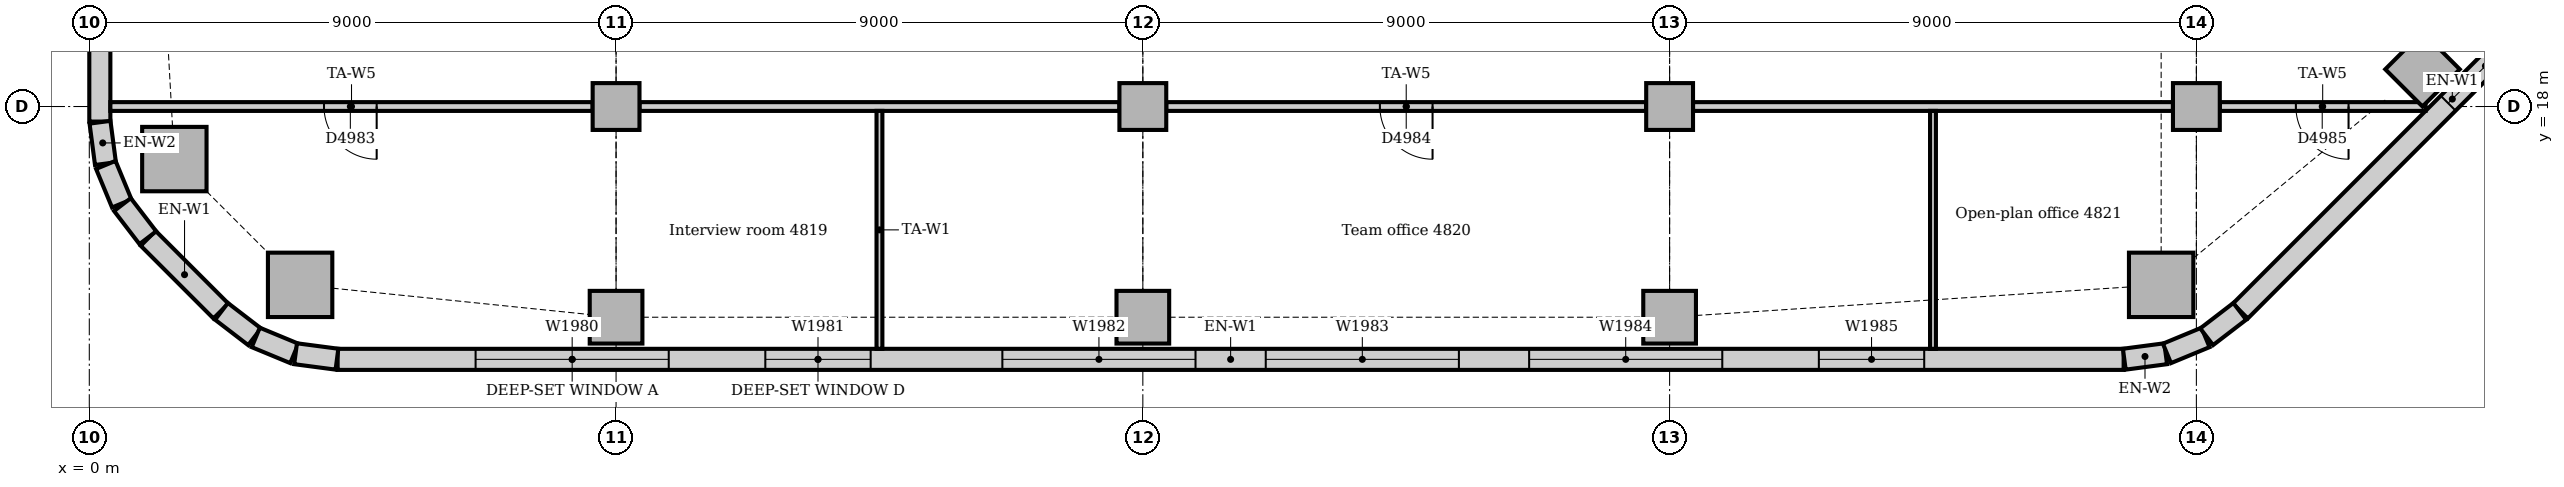
"""IFC4 building model, lengths in metres.
Left out: names, types, materials, properties, quantities, classifications, styles, units other than length and angle.
Written with IfcOpenShell. Run it as: python <this file> out.ifc"""

import sys

from ifc_helpers import new_model, si_unit, direction, frame, frame_2d, origin, origin_2d, place, context, subcontext, project, spatial, rectangle, extrude, element, fill, save


model = new_model("IFC4")
c1 = context("Model", 3, precision=1e-05, world=origin(), true_north=direction((0.0, 1.0)))
c2 = subcontext(c1, "Body", "Model", "MODEL_VIEW")
j1 = project(units=[si_unit("LENGTHUNIT", "METRE"), si_unit("PLANEANGLEUNIT", "RADIAN")], contexts=[c1])
p1 = place(None, origin())
s1 = spatial("IfcSite", under=j1, at=p1, CompositionType="ELEMENT")
p2 = place(p1, origin())
s2 = spatial("IfcBuilding", under=s1, at=p2, CompositionType="ELEMENT")
p3 = place(p2, frame((0.0, 0.0, 202.0)))
s3 = spatial("IfcBuildingStorey", under=s2, at=p3, CompositionType="ELEMENT", Elevation=202.0)
for number, where, z_axis, x_axis in (
    (1, (3.602, 14.953, 0.0), (0.0, 0.0, 1.0), (1.0, 0.0, 0.0)),
    (2, (35.398, 14.953, 0.0), (0.0, 0.0, 1.0), (1.0, 0.0, 0.0)),
    (3, (1.453, 17.102, 0.0), (0.0, 0.0, 1.0), (1.0, 0.0, 0.0)),
):
    element("IfcColumn", number, at=place(p3, frame(where, z_axis=z_axis, x_axis=x_axis)), inside=s3, PredefinedType="COLUMN", context=c2, shape_type="SweptSolid", body=[
        extrude(rectangle(XDim=1.1, YDim=1.1, at=origin_2d()), origin(), (0.0, 0.0, 1.0), 3.85),
    ])
for number, where, z_axis, x_axis in (
    (4, (9.0, 14.4, 0.0), (0.0, 0.0, 1.0), (1.0, 0.0, 0.0)),
    (5, (18.0, 14.4, 0.0), (0.0, 0.0, 1.0), (1.0, 0.0, 0.0)),
    (6, (27.0, 14.4, 0.0), (0.0, 0.0, 1.0), (1.0, 0.0, 0.0)),
    (7, (39.864, 18.636, 0.0), (0.0, 0.0, 1.0), (0.707, 0.707, 0.0)),
):
    element("IfcColumn", number, at=place(p3, frame(where, z_axis=z_axis, x_axis=x_axis)), inside=s3, PredefinedType="COLUMN", context=c2, shape_type="SweptSolid", body=[
        extrude(rectangle(XDim=0.9, YDim=0.9, at=origin_2d()), origin(), (0.0, 0.0, 1.0), 3.85),
    ])
for number, where, z_axis, x_axis in (
    (8, (9.0, 18.0, 0.0), (0.0, 0.0, 1.0), (1.0, 0.0, 0.0)),
    (9, (18.0, 18.0, 0.0), (0.0, 0.0, 1.0), (1.0, 0.0, 0.0)),
    (10, (27.0, 18.0, 0.0), (0.0, 0.0, 1.0), (1.0, 0.0, 0.0)),
    (11, (36.0, 18.0, 0.0), (0.0, 0.0, 1.0), (1.0, 0.0, 0.0)),
):
    element("IfcColumn", number, at=place(p3, frame(where, z_axis=z_axis, x_axis=x_axis)), inside=s3, PredefinedType="COLUMN", context=c2, shape_type="SweptSolid", body=[
        extrude(rectangle(XDim=0.8, YDim=0.8, at=origin_2d()), origin(), (0.0, 0.0, 1.0), 3.85),
    ])
p4 = place(p3, frame((4.243, 13.68, 0.0), z_axis=(0.0, 0.0, 1.0), x_axis=(1.0, 0.0, 0.0)))
e12 = element("IfcWall", 12, at=p4, inside=s3, PredefinedType="STANDARD", context=c2, shape_type="SweptSolid", body=[
    extrude(rectangle(XDim=30.515, YDim=0.36, at=frame_2d((15.257, 0.0))), origin(), (0.0, 0.0, 1.0), 3.85),
])
p5 = place(p4, frame((2.357, 0.0, 0.9)))
e13 = element("IfcOpeningElement", 13, at=p5, cuts=e12, PredefinedType="OPENING", context=c2, shape_type="SweptSolid", body=[
    extrude(rectangle(XDim=3.3, YDim=1.6, at=frame_2d((1.65, 0.8))), frame((0.0, 0.19, 0.0), z_axis=(0.0, -1.0, 0.0), x_axis=(1.0, 0.0, 0.0)), (0.0, 0.0, 1.0), 0.38),
])
p6 = place(p4, frame((7.307, 0.0, 0.9)))
e14 = element("IfcOpeningElement", 14, at=p6, cuts=e12, PredefinedType="OPENING", context=c2, shape_type="SweptSolid", body=[
    extrude(rectangle(XDim=1.8, YDim=1.6, at=frame_2d((0.9, 0.8))), frame((0.0, 0.19, 0.0), z_axis=(0.0, -1.0, 0.0), x_axis=(1.0, 0.0, 0.0)), (0.0, 0.0, 1.0), 0.38),
])
p7 = place(p4, frame((11.357, 0.0, 0.9)))
e15 = element("IfcOpeningElement", 15, at=p7, cuts=e12, PredefinedType="OPENING", context=c2, shape_type="SweptSolid", body=[
    extrude(rectangle(XDim=3.3, YDim=1.6, at=frame_2d((1.65, 0.8))), frame((0.0, 0.19, 0.0), z_axis=(0.0, -1.0, 0.0), x_axis=(1.0, 0.0, 0.0)), (0.0, 0.0, 1.0), 0.38),
])
p8 = place(p4, frame((15.857, 0.0, 0.9)))
e16 = element("IfcOpeningElement", 16, at=p8, cuts=e12, PredefinedType="OPENING", context=c2, shape_type="SweptSolid", body=[
    extrude(rectangle(XDim=3.3, YDim=1.6, at=frame_2d((1.65, 0.8))), frame((0.0, 0.19, 0.0), z_axis=(0.0, -1.0, 0.0), x_axis=(1.0, 0.0, 0.0)), (0.0, 0.0, 1.0), 0.38),
])
p9 = place(p4, frame((20.357, 0.0, 0.9)))
e17 = element("IfcOpeningElement", 17, at=p9, cuts=e12, PredefinedType="OPENING", context=c2, shape_type="SweptSolid", body=[
    extrude(rectangle(XDim=3.3, YDim=1.6, at=frame_2d((1.65, 0.8))), frame((0.0, 0.19, 0.0), z_axis=(0.0, -1.0, 0.0), x_axis=(1.0, 0.0, 0.0)), (0.0, 0.0, 1.0), 0.38),
])
p10 = place(p4, frame((25.307, 0.0, 0.9)))
e18 = element("IfcOpeningElement", 18, at=p10, cuts=e12, PredefinedType="OPENING", context=c2, shape_type="SweptSolid", body=[
    extrude(rectangle(XDim=1.8, YDim=1.6, at=frame_2d((0.9, 0.8))), frame((0.0, 0.19, 0.0), z_axis=(0.0, -1.0, 0.0), x_axis=(1.0, 0.0, 0.0)), (0.0, 0.0, 1.0), 0.38),
])
p11 = place(p3, frame((36.751, 14.506, 0.0), z_axis=(0.0, 0.0, 1.0), x_axis=(0.707106781187, 0.707106781187, 0.0)))
e19 = element("IfcWall", 19, at=p11, inside=s3, PredefinedType="STANDARD", context=c2, shape_type="SweptSolid", body=[
    extrude(rectangle(XDim=10.243, YDim=0.36, at=frame_2d((5.121, 0.0))), origin(), (0.0, 0.0, 1.0), 3.85),
])
p12 = place(p11, frame((5.021, 0.0, 0.9)))
e20 = element("IfcOpeningElement", 20, at=p12, cuts=e19, PredefinedType="OPENING", context=c2, shape_type="SweptSolid", body=[
    extrude(rectangle(XDim=1.8, YDim=1.6, at=frame_2d((0.9, 0.8))), frame((0.0, 0.19, 0.0), z_axis=(0.0, -1.0, 0.0), x_axis=(1.0, 0.0, 0.0)), (0.0, 0.0, 1.0), 0.38),
])
p13 = place(p3, frame((0.18, 21.0, 0.0), z_axis=(0.0, 0.0, 1.0), x_axis=(0.0, -1.0, 0.0)))
e21 = element("IfcWall", 21, at=p13, inside=s3, PredefinedType="STANDARD", context=c2, shape_type="SweptSolid", body=[
    extrude(rectangle(XDim=3.257, YDim=0.36, at=frame_2d((1.629, 0.0))), origin(), (0.0, 0.0, 1.0), 3.85),
])
p14 = place(p3, frame((1.006, 15.749, 0.0), z_axis=(0.0, 0.0, 1.0), x_axis=(0.707106781187, -0.707106781187, 0.0)))
e22 = element("IfcWall", 22, at=p14, inside=s3, PredefinedType="STANDARD", context=c2, shape_type="SweptSolid", body=[
    extrude(rectangle(XDim=1.757, YDim=0.36, at=frame_2d((0.879, 0.0))), origin(), (0.0, 0.0, 1.0), 3.85),
])
for number, where, z_axis, x_axis in (
    (23, (34.769, 13.683, 0.0), (0.0, 0.0, 1.0), (0.991, 0.131, 0.0)),
    (24, (35.497, 13.782, 0.0), (0.0, 0.0, 1.0), (0.924, 0.383, 0.0)),
):
    element("IfcWall", number, at=place(p3, frame(where, z_axis=z_axis, x_axis=x_axis)), inside=s3, PredefinedType="STANDARD", context=c2, shape_type="SweptSolid", body=[
        extrude(rectangle(XDim=0.713, YDim=0.36, at=frame_2d((0.356, 0.0))), origin(), (0.0, 0.0, 1.0), 3.85),
    ])
p15 = place(p3, frame((36.175, 14.066, 0.0), z_axis=(0.0, 0.0, 1.0), x_axis=(0.793321924995, 0.608802368033, 0.0)))
e25 = element("IfcWall", 25, at=p15, inside=s3, PredefinedType="STANDARD", context=c2, shape_type="SweptSolid", body=[
    extrude(rectangle(XDim=0.713, YDim=0.36, at=frame_2d((0.357, 0.0))), origin(), (0.0, 0.0, 1.0), 3.85),
])
for number, where, z_axis, x_axis in (
    (26, (0.183, 17.731, 0.0), (0.0, 0.0, 1.0), (0.131, -0.991, 0.0)),
    (27, (0.282, 17.003, 0.0), (0.0, 0.0, 1.0), (0.383, -0.924, 0.0)),
):
    element("IfcWall", number, at=place(p3, frame(where, z_axis=z_axis, x_axis=x_axis)), inside=s3, PredefinedType="STANDARD", context=c2, shape_type="SweptSolid", body=[
        extrude(rectangle(XDim=0.713, YDim=0.36, at=frame_2d((0.356, 0.0))), origin(), (0.0, 0.0, 1.0), 3.85),
    ])
for number, where, z_axis, x_axis in (
    (28, (0.566, 16.325, 0.0), (0.0, 0.0, 1.0), (0.609, -0.793, 0.0)),
    (29, (2.259, 14.5, 0.0), (0.0, 0.0, 1.0), (0.793, -0.609, 0.0)),
):
    element("IfcWall", number, at=place(p3, frame(where, z_axis=z_axis, x_axis=x_axis)), inside=s3, PredefinedType="STANDARD", context=c2, shape_type="SweptSolid", body=[
        extrude(rectangle(XDim=0.713, YDim=0.36, at=frame_2d((0.357, 0.0))), origin(), (0.0, 0.0, 1.0), 3.85),
    ])
for number, where, z_axis, x_axis in (
    (30, (2.844, 14.055, 0.0), (0.0, 0.0, 1.0), (0.924, -0.383, 0.0)),
    (31, (3.524, 13.776, 0.0), (0.0, 0.0, 1.0), (0.991, -0.131, 0.0)),
):
    element("IfcWall", number, at=place(p3, frame(where, z_axis=z_axis, x_axis=x_axis)), inside=s3, PredefinedType="STANDARD", context=c2, shape_type="SweptSolid", body=[
        extrude(rectangle(XDim=0.713, YDim=0.36, at=frame_2d((0.356, 0.0))), origin(), (0.0, 0.0, 1.0), 3.85),
    ])
p16 = place(p3, frame((36.4, 18.0, 0.0), z_axis=(0.0, 0.0, 1.0), x_axis=(1.0, 0.0, 0.0)))
e32 = element("IfcWall", 32, at=p16, inside=s3, PredefinedType="PARTITIONING", context=c2, shape_type="SweptSolid", body=[
    extrude(rectangle(XDim=3.516, YDim=0.15, at=frame_2d((1.758, 0.0))), origin(), (0.0, 0.0, 1.0), 3.602),
])
p17 = place(p16, frame((1.3, 0.0, 0.0)))
e33 = element("IfcOpeningElement", 33, at=p17, cuts=e32, PredefinedType="OPENING", context=c2, shape_type="SweptSolid", body=[
    extrude(rectangle(XDim=0.9, YDim=2.1, at=frame_2d((0.45, 1.05))), frame((0.0, 0.085, 0.0), z_axis=(0.0, -1.0, 0.0), x_axis=(1.0, 0.0, 0.0)), (0.0, 0.0, 1.0), 0.17),
])
p18 = place(p3, frame((27.4, 18.0, 0.0), z_axis=(0.0, 0.0, 1.0), x_axis=(1.0, 0.0, 0.0)))
e34 = element("IfcWall", 34, at=p18, inside=s3, PredefinedType="PARTITIONING", context=c2, shape_type="SweptSolid", body=[
    extrude(rectangle(XDim=8.2, YDim=0.15, at=frame_2d((4.1, 0.0))), origin(), (0.0, 0.0, 1.0), 3.254),
])
p19 = place(p3, frame((18.4, 18.0, 0.0), z_axis=(0.0, 0.0, 1.0), x_axis=(1.0, 0.0, 0.0)))
e35 = element("IfcWall", 35, at=p19, inside=s3, PredefinedType="PARTITIONING", context=c2, shape_type="SweptSolid", body=[
    extrude(rectangle(XDim=8.2, YDim=0.15, at=frame_2d((4.1, 0.0))), origin(), (0.0, 0.0, 1.0), 3.254),
])
p20 = place(p19, frame((3.65, 0.0, 0.0)))
e36 = element("IfcOpeningElement", 36, at=p20, cuts=e35, PredefinedType="OPENING", context=c2, shape_type="SweptSolid", body=[
    extrude(rectangle(XDim=0.9, YDim=2.1, at=frame_2d((0.45, 1.05))), frame((0.0, 0.085, 0.0), z_axis=(0.0, -1.0, 0.0), x_axis=(1.0, 0.0, 0.0)), (0.0, 0.0, 1.0), 0.17),
])
p21 = place(p3, frame((9.4, 18.0, 0.0), z_axis=(0.0, 0.0, 1.0), x_axis=(1.0, 0.0, 0.0)))
e37 = element("IfcWall", 37, at=p21, inside=s3, PredefinedType="PARTITIONING", context=c2, shape_type="SweptSolid", body=[
    extrude(rectangle(XDim=8.2, YDim=0.15, at=frame_2d((4.1, 0.0))), origin(), (0.0, 0.0, 1.0), 3.254),
])
p22 = place(p3, frame((0.36, 18.0, 0.0), z_axis=(0.0, 0.0, 1.0), x_axis=(1.0, 0.0, 0.0)))
e38 = element("IfcWall", 38, at=p22, inside=s3, PredefinedType="PARTITIONING", context=c2, shape_type="SweptSolid", body=[
    extrude(rectangle(XDim=8.24, YDim=0.15, at=frame_2d((4.12, 0.0))), origin(), (0.0, 0.0, 1.0), 3.254),
])
p23 = place(p22, frame((3.65, 0.0, 0.0)))
e39 = element("IfcOpeningElement", 39, at=p23, cuts=e38, PredefinedType="OPENING", context=c2, shape_type="SweptSolid", body=[
    extrude(rectangle(XDim=0.9, YDim=2.1, at=frame_2d((0.45, 1.05))), frame((0.0, 0.085, 0.0), z_axis=(0.0, -1.0, 0.0), x_axis=(1.0, 0.0, 0.0)), (0.0, 0.0, 1.0), 0.17),
])
for number, where, z_axis, x_axis in (
    (40, (13.5, 13.86, 0.0), (0.0, 0.0, 1.0), (0.0, 1.0, 0.0)),
    (41, (31.5, 13.86, 0.0), (0.0, 0.0, 1.0), (0.0, 1.0, 0.0)),
):
    element("IfcWall", number, at=place(p3, frame(where, z_axis=z_axis, x_axis=x_axis)), inside=s3, PredefinedType="PARTITIONING", context=c2, shape_type="SweptSolid", body=[
        extrude(rectangle(XDim=4.065, YDim=0.1, at=frame_2d((2.033, 0.0))), origin(), (0.0, 0.0, 1.0), 3.85),
    ])
p24 = place(p5, origin())
e42 = element("IfcWindow", 42, at=p24, inside=s3, PartitioningType="SINGLE_PANEL", PredefinedType="WINDOW", context=c2, shape_type="SweptSolid", body=[
    extrude(rectangle(XDim=3.3, YDim=1.6, at=frame_2d((1.65, 0.8))), frame((0.0, 0.13, 0.0), z_axis=(0.0, -1.0, 0.0), x_axis=(1.0, 0.0, 0.0)), (0.0, 0.0, 1.0), 0.06),
])
fill(e13, e42)
p25 = place(p6, origin())
e43 = element("IfcWindow", 43, at=p25, inside=s3, PartitioningType="SINGLE_PANEL", PredefinedType="WINDOW", context=c2, shape_type="SweptSolid", body=[
    extrude(rectangle(XDim=1.8, YDim=1.6, at=frame_2d((0.9, 0.8))), frame((0.0, 0.13, 0.0), z_axis=(0.0, -1.0, 0.0), x_axis=(1.0, 0.0, 0.0)), (0.0, 0.0, 1.0), 0.06),
])
fill(e14, e43)
p26 = place(p7, origin())
e44 = element("IfcWindow", 44, at=p26, inside=s3, PartitioningType="SINGLE_PANEL", PredefinedType="WINDOW", context=c2, shape_type="SweptSolid", body=[
    extrude(rectangle(XDim=3.3, YDim=1.6, at=frame_2d((1.65, 0.8))), frame((0.0, 0.13, 0.0), z_axis=(0.0, -1.0, 0.0), x_axis=(1.0, 0.0, 0.0)), (0.0, 0.0, 1.0), 0.06),
])
fill(e15, e44)
p27 = place(p8, origin())
e45 = element("IfcWindow", 45, at=p27, inside=s3, PartitioningType="SINGLE_PANEL", PredefinedType="WINDOW", context=c2, shape_type="SweptSolid", body=[
    extrude(rectangle(XDim=3.3, YDim=1.6, at=frame_2d((1.65, 0.8))), frame((0.0, 0.13, 0.0), z_axis=(0.0, -1.0, 0.0), x_axis=(1.0, 0.0, 0.0)), (0.0, 0.0, 1.0), 0.06),
])
fill(e16, e45)
p28 = place(p9, origin())
e46 = element("IfcWindow", 46, at=p28, inside=s3, PartitioningType="SINGLE_PANEL", PredefinedType="WINDOW", context=c2, shape_type="SweptSolid", body=[
    extrude(rectangle(XDim=3.3, YDim=1.6, at=frame_2d((1.65, 0.8))), frame((0.0, 0.13, 0.0), z_axis=(0.0, -1.0, 0.0), x_axis=(1.0, 0.0, 0.0)), (0.0, 0.0, 1.0), 0.06),
])
fill(e17, e46)
p29 = place(p10, origin())
e47 = element("IfcWindow", 47, at=p29, inside=s3, PartitioningType="SINGLE_PANEL", PredefinedType="WINDOW", context=c2, shape_type="SweptSolid", body=[
    extrude(rectangle(XDim=1.8, YDim=1.6, at=frame_2d((0.9, 0.8))), frame((0.0, 0.13, 0.0), z_axis=(0.0, -1.0, 0.0), x_axis=(1.0, 0.0, 0.0)), (0.0, 0.0, 1.0), 0.06),
])
fill(e18, e47)
p30 = place(p12, origin())
e48 = element("IfcWindow", 48, at=p30, inside=s3, PartitioningType="SINGLE_PANEL", PredefinedType="WINDOW", context=c2, shape_type="SweptSolid", body=[
    extrude(rectangle(XDim=1.8, YDim=1.6, at=frame_2d((0.9, 0.8))), frame((0.0, 0.13, 0.0), z_axis=(0.0, -1.0, 0.0), x_axis=(1.0, 0.0, 0.0)), (0.0, 0.0, 1.0), 0.06),
])
fill(e20, e48)
p31 = place(p23, frame((0.9, 0.0, 0.0), z_axis=(0.0, 0.0, 1.0), x_axis=(-1.0, 0.0, 0.0)))
e49 = element("IfcDoor", 49, at=p31, inside=s3, OperationType="SINGLE_SWING_LEFT", PredefinedType="DOOR", context=c2, shape_type="SweptSolid", body=[
    extrude(rectangle(XDim=0.9, YDim=2.1, at=frame_2d((0.45, 1.05))), frame((0.0, 0.025, 0.0), z_axis=(0.0, -1.0, 0.0), x_axis=(1.0, 0.0, 0.0)), (0.0, 0.0, 1.0), 0.05),
])
fill(e39, e49)
p32 = place(p20, frame((0.9, 0.0, 0.0), z_axis=(0.0, 0.0, 1.0), x_axis=(-1.0, 0.0, 0.0)))
e50 = element("IfcDoor", 50, at=p32, inside=s3, OperationType="SINGLE_SWING_LEFT", PredefinedType="DOOR", context=c2, shape_type="SweptSolid", body=[
    extrude(rectangle(XDim=0.9, YDim=2.1, at=frame_2d((0.45, 1.05))), frame((0.0, 0.025, 0.0), z_axis=(0.0, -1.0, 0.0), x_axis=(1.0, 0.0, 0.0)), (0.0, 0.0, 1.0), 0.05),
])
fill(e36, e50)
p33 = place(p17, frame((0.9, 0.0, 0.0), z_axis=(0.0, 0.0, 1.0), x_axis=(-1.0, 0.0, 0.0)))
e51 = element("IfcDoor", 51, at=p33, inside=s3, OperationType="SINGLE_SWING_LEFT", PredefinedType="DOOR", context=c2, shape_type="SweptSolid", body=[
    extrude(rectangle(XDim=0.9, YDim=2.1, at=frame_2d((0.45, 1.05))), frame((0.0, 0.025, 0.0), z_axis=(0.0, -1.0, 0.0), x_axis=(1.0, 0.0, 0.0)), (0.0, 0.0, 1.0), 0.05),
])
fill(e33, e51)
save(model, sys.argv[1])
